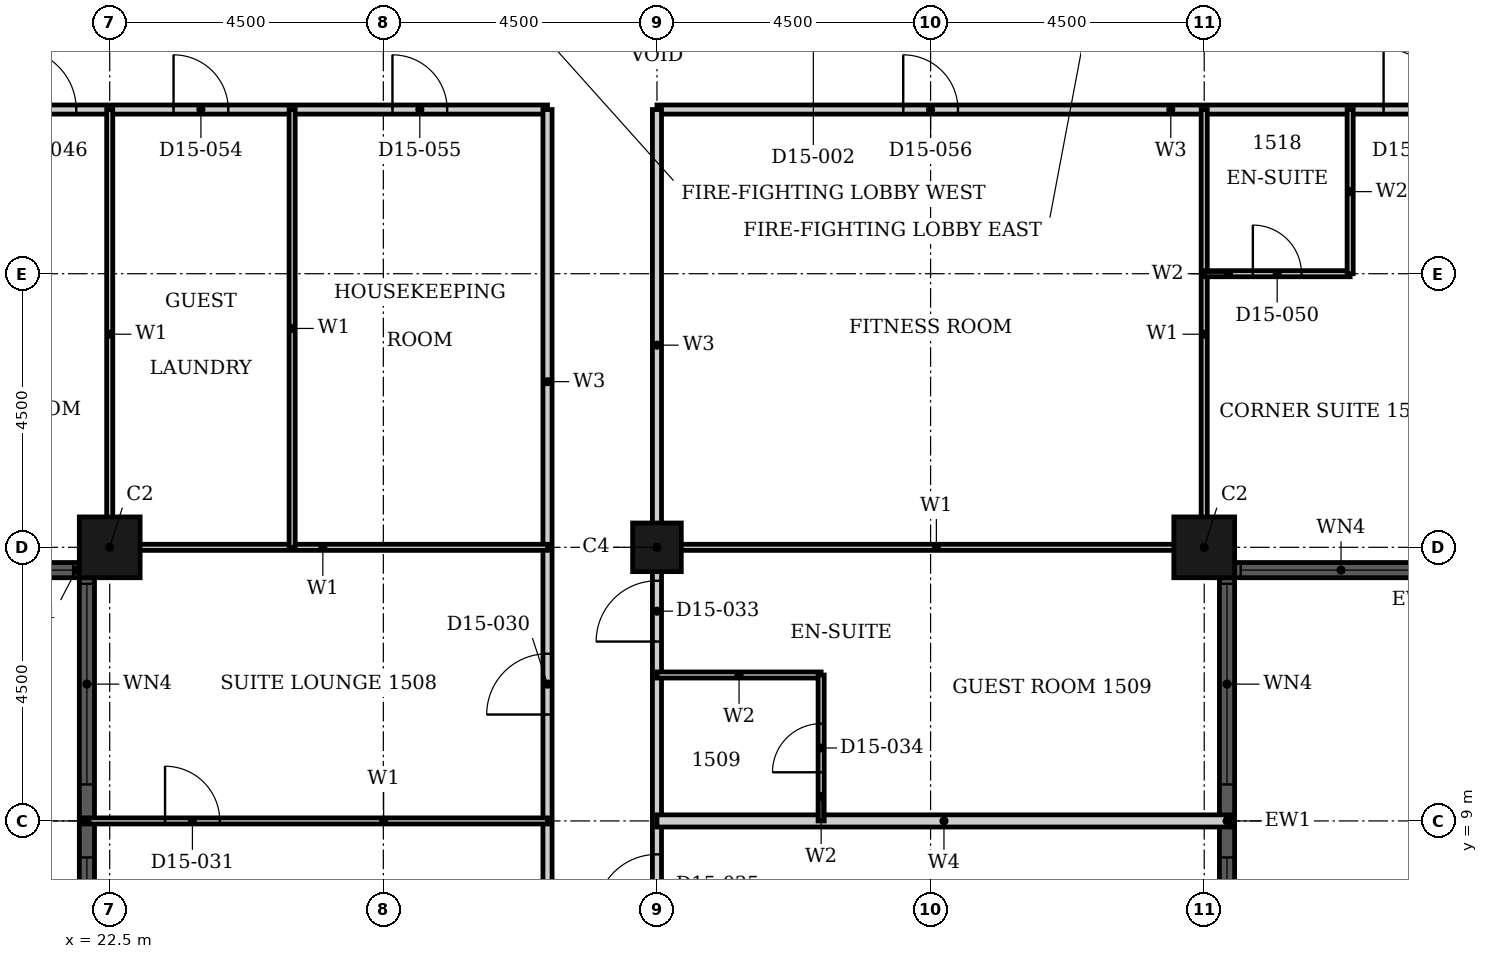
"""IFC4 building model, lengths in metres.
Left out: names, types, materials, properties, quantities, classifications, styles, units other than length and angle.
Written with IfcOpenShell. Run it as: python <this file> out.ifc"""

import sys

from ifc_helpers import new_model, si_unit, direction, frame, frame_2d, origin, origin_2d, place, context, subcontext, project, spatial, rectangle, hollow_rectangle, extrude, element, fill, save


model = new_model("IFC4")
c1 = context("Model", 3, precision=1e-05, world=origin(), true_north=direction((0.0, 1.0)))
c2 = subcontext(c1, "Body", "Model", "MODEL_VIEW")
j1 = project(units=[si_unit("LENGTHUNIT", "METRE"), si_unit("PLANEANGLEUNIT", "RADIAN")], contexts=[c1])
p1 = place(None, origin())
s1 = spatial("IfcSite", under=j1, at=p1, CompositionType="ELEMENT")
p2 = place(p1, origin())
s2 = spatial("IfcBuilding", under=s1, at=p2, CompositionType="ELEMENT")
p3 = place(p2, frame((0.0, 0.0, 67.2)))
s3 = spatial("IfcBuildingStorey", under=s2, at=p3, CompositionType="ELEMENT", Elevation=67.2)
for number, where, z_axis, x_axis in (
    (1, (40.5, 13.5, 0.0), (0.0, 0.0, 1.0), (1.0, 0.0, 0.0)),
    (2, (22.5, 13.5, 0.0), (0.0, 0.0, 1.0), (1.0, 0.0, 0.0)),
):
    element("IfcColumn", number, at=place(p3, frame(where, z_axis=z_axis, x_axis=x_axis)), inside=s3, PredefinedType="COLUMN", context=c2, shape_type="SweptSolid", body=[
        extrude(hollow_rectangle(XDim=1.0, YDim=1.0, WallThickness=0.032, at=origin_2d()), origin(), (0.0, 0.0, 1.0), 3.6),
    ])
p4 = place(p3, frame((31.5, 13.5, 0.0), z_axis=(0.0, 0.0, 1.0), x_axis=(1.0, 0.0, 0.0)))
e3 = element("IfcColumn", 3, at=p4, inside=s3, PredefinedType="COLUMN", context=c2, shape_type="SweptSolid", body=[
    extrude(hollow_rectangle(XDim=0.8, YDim=0.8, WallThickness=0.025, at=origin_2d()), origin(), (0.0, 0.0, 1.0), 3.6),
])
p5 = place(p3, frame((40.875, 5.0, 0.0), z_axis=(0.0, 0.0, 1.0), x_axis=(0.0, 1.0, 0.0)))
e4 = element("IfcWall", 4, at=p5, inside=s3, PredefinedType="SOLIDWALL", context=c2, shape_type="SweptSolid", body=[
    extrude(rectangle(XDim=8.0, YDim=0.25, at=frame_2d((4.0, 0.0))), origin(), (0.0, 0.0, 1.0), 3.6),
])
p6 = place(p5, frame((0.1, 0.0, 0.9)))
e5 = element("IfcOpeningElement", 5, at=p6, cuts=e4, PredefinedType="OPENING", context=c2, shape_type="SweptSolid", body=[
    extrude(rectangle(XDim=3.3, YDim=2.08, at=frame_2d((1.65, 1.04))), frame((0.0, 0.135, 0.0), z_axis=(0.0, -1.0, 0.0), x_axis=(1.0, 0.0, 0.0)), (0.0, 0.0, 1.0), 0.27),
])
p7 = place(p5, frame((4.6, 0.0, 0.9)))
e6 = element("IfcOpeningElement", 6, at=p7, cuts=e4, PredefinedType="OPENING", context=c2, shape_type="SweptSolid", body=[
    extrude(rectangle(XDim=3.3, YDim=2.08, at=frame_2d((1.65, 1.04))), frame((0.0, 0.135, 0.0), z_axis=(0.0, -1.0, 0.0), x_axis=(1.0, 0.0, 0.0)), (0.0, 0.0, 1.0), 0.27),
])
p8 = place(p3, frame((41.0, 13.125, 0.0), z_axis=(0.0, 0.0, 1.0), x_axis=(1.0, 0.0, 0.0)))
e7 = element("IfcWall", 7, at=p8, inside=s3, PredefinedType="SOLIDWALL", context=c2, shape_type="SweptSolid", body=[
    extrude(rectangle(XDim=3.5, YDim=0.25, at=frame_2d((1.75, 0.0))), origin(), (0.0, 0.0, 1.0), 3.6),
])
p9 = place(p8, frame((0.1, 0.0, 0.9)))
e8 = element("IfcOpeningElement", 8, at=p9, cuts=e7, PredefinedType="OPENING", context=c2, shape_type="SweptSolid", body=[
    extrude(rectangle(XDim=3.3, YDim=2.08, at=frame_2d((1.65, 1.04))), frame((0.0, 0.135, 0.0), z_axis=(0.0, -1.0, 0.0), x_axis=(1.0, 0.0, 0.0)), (0.0, 0.0, 1.0), 0.27),
])
p10 = place(p3, frame((18.5, 13.125, 0.0), z_axis=(0.0, 0.0, 1.0), x_axis=(1.0, 0.0, 0.0)))
e9 = element("IfcWall", 9, at=p10, inside=s3, PredefinedType="SOLIDWALL", context=c2, shape_type="SweptSolid", body=[
    extrude(rectangle(XDim=3.5, YDim=0.25, at=frame_2d((1.75, 0.0))), origin(), (0.0, 0.0, 1.0), 3.6),
])
p11 = place(p10, frame((0.1, 0.0, 0.9)))
e10 = element("IfcOpeningElement", 10, at=p11, cuts=e9, PredefinedType="OPENING", context=c2, shape_type="SweptSolid", body=[
    extrude(rectangle(XDim=3.3, YDim=2.08, at=frame_2d((1.65, 1.04))), frame((0.0, 0.135, 0.0), z_axis=(0.0, -1.0, 0.0), x_axis=(1.0, 0.0, 0.0)), (0.0, 0.0, 1.0), 0.27),
])
p12 = place(p3, frame((22.125, 13.0, 0.0), z_axis=(0.0, 0.0, 1.0), x_axis=(0.0, -1.0, 0.0)))
e11 = element("IfcWall", 11, at=p12, inside=s3, PredefinedType="SOLIDWALL", context=c2, shape_type="SweptSolid", body=[
    extrude(rectangle(XDim=8.0, YDim=0.25, at=frame_2d((4.0, 0.0))), origin(), (0.0, 0.0, 1.0), 3.6),
])
p13 = place(p12, frame((0.1, 0.0, 0.9)))
e12 = element("IfcOpeningElement", 12, at=p13, cuts=e11, PredefinedType="OPENING", context=c2, shape_type="SweptSolid", body=[
    extrude(rectangle(XDim=3.3, YDim=2.08, at=frame_2d((1.65, 1.04))), frame((0.0, 0.135, 0.0), z_axis=(0.0, -1.0, 0.0), x_axis=(1.0, 0.0, 0.0)), (0.0, 0.0, 1.0), 0.27),
])
p14 = place(p12, frame((4.6, 0.0, 0.9)))
e13 = element("IfcOpeningElement", 13, at=p14, cuts=e11, PredefinedType="OPENING", context=c2, shape_type="SweptSolid", body=[
    extrude(rectangle(XDim=3.3, YDim=2.08, at=frame_2d((1.65, 1.04))), frame((0.0, 0.135, 0.0), z_axis=(0.0, -1.0, 0.0), x_axis=(1.0, 0.0, 0.0)), (0.0, 0.0, 1.0), 0.27),
])
p15 = place(p3, frame((31.5, 20.7, 0.0), z_axis=(0.0, 0.0, 1.0), x_axis=(1.0, 0.0, 0.0)))
e14 = element("IfcWall", 14, at=p15, inside=s3, PredefinedType="PARTITIONING", context=c2, shape_type="SweptSolid", body=[
    extrude(rectangle(XDim=15.3, YDim=0.15, at=frame_2d((7.65, 0.0))), origin(), (0.0, 0.0, 1.0), 3.3),
])
p16 = place(p15, frame((11.95, 0.0, 0.0)))
e15 = element("IfcOpeningElement", 15, at=p16, cuts=e14, PredefinedType="OPENING", context=c2, shape_type="SweptSolid", body=[
    extrude(rectangle(XDim=1.0, YDim=2.1, at=frame_2d((0.5, 1.05))), frame((0.0, 0.085, 0.0), z_axis=(0.0, -1.0, 0.0), x_axis=(1.0, 0.0, 0.0)), (0.0, 0.0, 1.0), 0.17),
])
p17 = place(p15, frame((4.05, 0.0, 0.0)))
e16 = element("IfcOpeningElement", 16, at=p17, cuts=e14, PredefinedType="OPENING", context=c2, shape_type="SweptSolid", body=[
    extrude(rectangle(XDim=0.9, YDim=2.1, at=frame_2d((0.45, 1.05))), frame((0.0, 0.085, 0.0), z_axis=(0.0, -1.0, 0.0), x_axis=(1.0, 0.0, 0.0)), (0.0, 0.0, 1.0), 0.17),
])
p18 = place(p3, frame((16.2, 20.7, 0.0), z_axis=(0.0, 0.0, 1.0), x_axis=(1.0, 0.0, 0.0)))
e17 = element("IfcWall", 17, at=p18, inside=s3, PredefinedType="PARTITIONING", context=c2, shape_type="SweptSolid", body=[
    extrude(rectangle(XDim=13.5, YDim=0.15, at=frame_2d((6.75, 0.0))), origin(), (0.0, 0.0, 1.0), 3.3),
])
p19 = place(p18, frame((4.75, 0.0, 0.0)))
e18 = element("IfcOpeningElement", 18, at=p19, cuts=e17, PredefinedType="OPENING", context=c2, shape_type="SweptSolid", body=[
    extrude(rectangle(XDim=1.0, YDim=2.1, at=frame_2d((0.5, 1.05))), frame((0.0, 0.085, 0.0), z_axis=(0.0, -1.0, 0.0), x_axis=(1.0, 0.0, 0.0)), (0.0, 0.0, 1.0), 0.17),
])
p20 = place(p18, frame((0.45, 0.0, 0.0)))
e19 = element("IfcOpeningElement", 19, at=p20, cuts=e17, PredefinedType="OPENING", context=c2, shape_type="SweptSolid", body=[
    extrude(rectangle(XDim=0.9, YDim=2.1, at=frame_2d((0.45, 1.05))), frame((0.0, 0.085, 0.0), z_axis=(0.0, -1.0, 0.0), x_axis=(1.0, 0.0, 0.0)), (0.0, 0.0, 1.0), 0.17),
])
p21 = place(p18, frame((7.35, 0.0, 0.0)))
e20 = element("IfcOpeningElement", 20, at=p21, cuts=e17, PredefinedType="OPENING", context=c2, shape_type="SweptSolid", body=[
    extrude(rectangle(XDim=0.9, YDim=2.1, at=frame_2d((0.45, 1.05))), frame((0.0, 0.085, 0.0), z_axis=(0.0, -1.0, 0.0), x_axis=(1.0, 0.0, 0.0)), (0.0, 0.0, 1.0), 0.17),
])
p22 = place(p18, frame((10.95, 0.0, 0.0)))
e21 = element("IfcOpeningElement", 21, at=p22, cuts=e17, PredefinedType="OPENING", context=c2, shape_type="SweptSolid", body=[
    extrude(rectangle(XDim=0.9, YDim=2.1, at=frame_2d((0.45, 1.05))), frame((0.0, 0.085, 0.0), z_axis=(0.0, -1.0, 0.0), x_axis=(1.0, 0.0, 0.0)), (0.0, 0.0, 1.0), 0.17),
])
p23 = place(p3, frame((29.7, 4.5, 0.0), z_axis=(0.0, 0.0, 1.0), x_axis=(0.0, 1.0, 0.0)))
e22 = element("IfcWall", 22, at=p23, inside=s3, PredefinedType="PARTITIONING", context=c2, shape_type="SweptSolid", body=[
    extrude(rectangle(XDim=16.2, YDim=0.15, at=frame_2d((8.1, 0.0))), origin(), (0.0, 0.0, 1.0), 3.3),
])
p24 = place(p23, frame((6.25, 0.0, 0.0)))
e23 = element("IfcOpeningElement", 23, at=p24, cuts=e22, PredefinedType="OPENING", context=c2, shape_type="SweptSolid", body=[
    extrude(rectangle(XDim=1.0, YDim=2.1, at=frame_2d((0.5, 1.05))), frame((0.0, 0.085, 0.0), z_axis=(0.0, -1.0, 0.0), x_axis=(1.0, 0.0, 0.0)), (0.0, 0.0, 1.0), 0.17),
])
p25 = place(p3, frame((31.5, 4.5, 0.0), z_axis=(0.0, 0.0, 1.0), x_axis=(0.0, 1.0, 0.0)))
e24 = element("IfcWall", 24, at=p25, inside=s3, PredefinedType="PARTITIONING", context=c2, shape_type="SweptSolid", body=[
    extrude(rectangle(XDim=16.2, YDim=0.15, at=frame_2d((8.1, 0.0))), origin(), (0.0, 0.0, 1.0), 2.58),
])
p26 = place(p25, frame((7.45, 0.0, 0.0)))
e25 = element("IfcOpeningElement", 25, at=p26, cuts=e24, PredefinedType="OPENING", context=c2, shape_type="SweptSolid", body=[
    extrude(rectangle(XDim=1.0, YDim=2.1, at=frame_2d((0.5, 1.05))), frame((0.0, 0.085, 0.0), z_axis=(0.0, -1.0, 0.0), x_axis=(1.0, 0.0, 0.0)), (0.0, 0.0, 1.0), 0.17),
])
p27 = place(p25, frame((2.95, 0.0, 0.0)))
e26 = element("IfcOpeningElement", 26, at=p27, cuts=e24, PredefinedType="OPENING", context=c2, shape_type="SweptSolid", body=[
    extrude(rectangle(XDim=1.0, YDim=2.1, at=frame_2d((0.5, 1.05))), frame((0.0, 0.085, 0.0), z_axis=(0.0, -1.0, 0.0), x_axis=(1.0, 0.0, 0.0)), (0.0, 0.0, 1.0), 0.17),
])
p28 = place(p3, frame((31.5, 13.5, 0.0), z_axis=(0.0, 0.0, 1.0), x_axis=(1.0, 0.0, 0.0)))
e27 = element("IfcWall", 27, at=p28, inside=s3, PredefinedType="PARTITIONING", context=c2, shape_type="SweptSolid", body=[
    extrude(rectangle(XDim=9.19, YDim=0.1, at=frame_2d((4.595, 0.0))), origin(), (0.0, 0.0, 1.0), 2.38),
])
p29 = place(p3, frame((22.31, 13.5, 0.0), z_axis=(0.0, 0.0, 1.0), x_axis=(1.0, 0.0, 0.0)))
e28 = element("IfcWall", 28, at=p29, inside=s3, PredefinedType="PARTITIONING", context=c2, shape_type="SweptSolid", body=[
    extrude(rectangle(XDim=7.39, YDim=0.1, at=frame_2d((3.695, 0.0))), origin(), (0.0, 0.0, 1.0), 2.38),
])
p30 = place(p3, frame((22.06, 9.0, 0.0), z_axis=(0.0, 0.0, 1.0), x_axis=(1.0, 0.0, 0.0)))
e29 = element("IfcWall", 29, at=p30, inside=s3, PredefinedType="PARTITIONING", context=c2, shape_type="SweptSolid", body=[
    extrude(rectangle(XDim=7.64, YDim=0.1, at=frame_2d((3.82, 0.0))), origin(), (0.0, 0.0, 1.0), 3.3),
])
p31 = place(p30, frame((1.35, 0.0, 0.0)))
e30 = element("IfcOpeningElement", 30, at=p31, cuts=e29, PredefinedType="OPENING", context=c2, shape_type="SweptSolid", body=[
    extrude(rectangle(XDim=0.9, YDim=2.1, at=frame_2d((0.45, 1.05))), frame((0.0, 0.06, 0.0), z_axis=(0.0, -1.0, 0.0), x_axis=(1.0, 0.0, 0.0)), (0.0, 0.0, 1.0), 0.12),
])
p32 = place(p3, frame((22.5, 13.31, 0.0), z_axis=(0.0, 0.0, 1.0), x_axis=(0.0, 1.0, 0.0)))
e31 = element("IfcWall", 31, at=p32, inside=s3, PredefinedType="PARTITIONING", context=c2, shape_type="SweptSolid", body=[
    extrude(rectangle(XDim=7.39, YDim=0.1, at=frame_2d((3.695, 0.0))), origin(), (0.0, 0.0, 1.0), 3.3),
])
p33 = place(p3, frame((25.5, 13.5, 0.0), z_axis=(0.0, 0.0, 1.0), x_axis=(0.0, 1.0, 0.0)))
e32 = element("IfcWall", 32, at=p33, inside=s3, PredefinedType="PARTITIONING", context=c2, shape_type="SweptSolid", body=[
    extrude(rectangle(XDim=7.2, YDim=0.1, at=frame_2d((3.6, 0.0))), origin(), (0.0, 0.0, 1.0), 3.3),
])
p34 = place(p3, frame((40.5, 13.31, 0.0), z_axis=(0.0, 0.0, 1.0), x_axis=(0.0, 1.0, 0.0)))
e33 = element("IfcWall", 33, at=p34, inside=s3, PredefinedType="PARTITIONING", context=c2, shape_type="SweptSolid", body=[
    extrude(rectangle(XDim=7.39, YDim=0.1, at=frame_2d((3.695, 0.0))), origin(), (0.0, 0.0, 1.0), 3.3),
])
p35 = place(p3, frame((31.5, 9.0, 0.0), z_axis=(0.0, 0.0, 1.0), x_axis=(1.0, 0.0, 0.0)))
e34 = element("IfcWall", 34, at=p35, inside=s3, PredefinedType="PARTITIONING", context=c2, shape_type="SweptSolid", body=[
    extrude(rectangle(XDim=9.44, YDim=0.2, at=frame_2d((4.72, 0.0))), origin(), (0.0, 0.0, 1.0), 3.3),
])
p36 = place(p3, frame((31.5, 11.4, 0.0), z_axis=(0.0, 0.0, 1.0), x_axis=(1.0, 0.0, 0.0)))
e35 = element("IfcWall", 35, at=p36, inside=s3, PredefinedType="PARTITIONING", context=c2, shape_type="SweptSolid", body=[
    extrude(rectangle(XDim=2.7, YDim=0.1, at=frame_2d((1.35, 0.0))), origin(), (0.0, 0.0, 1.0), 3.3),
])
p37 = place(p3, frame((40.5, 18.0, 0.0), z_axis=(0.0, 0.0, 1.0), x_axis=(1.0, 0.0, 0.0)))
e36 = element("IfcWall", 36, at=p37, inside=s3, PredefinedType="PARTITIONING", context=c2, shape_type="SweptSolid", body=[
    extrude(rectangle(XDim=2.4, YDim=0.1, at=frame_2d((1.2, 0.0))), origin(), (0.0, 0.0, 1.0), 3.3),
])
p38 = place(p37, frame((0.8, 0.0, 0.0)))
e37 = element("IfcOpeningElement", 37, at=p38, cuts=e36, PredefinedType="OPENING", context=c2, shape_type="SweptSolid", body=[
    extrude(rectangle(XDim=0.8, YDim=2.1, at=frame_2d((0.4, 1.05))), frame((0.0, 0.06, 0.0), z_axis=(0.0, -1.0, 0.0), x_axis=(1.0, 0.0, 0.0)), (0.0, 0.0, 1.0), 0.12),
])
p39 = place(p3, frame((34.2, 9.0, 0.0), z_axis=(0.0, 0.0, 1.0), x_axis=(0.0, 1.0, 0.0)))
e38 = element("IfcWall", 38, at=p39, inside=s3, PredefinedType="PARTITIONING", context=c2, shape_type="SweptSolid", body=[
    extrude(rectangle(XDim=2.4, YDim=0.1, at=frame_2d((1.2, 0.0))), origin(), (0.0, 0.0, 1.0), 3.3),
])
p40 = place(p39, frame((0.8, 0.0, 0.0)))
e39 = element("IfcOpeningElement", 39, at=p40, cuts=e38, PredefinedType="OPENING", context=c2, shape_type="SweptSolid", body=[
    extrude(rectangle(XDim=0.8, YDim=2.1, at=frame_2d((0.4, 1.05))), frame((0.0, 0.06, 0.0), z_axis=(0.0, -1.0, 0.0), x_axis=(1.0, 0.0, 0.0)), (0.0, 0.0, 1.0), 0.12),
])
p41 = place(p3, frame((42.9, 18.0, 0.0), z_axis=(0.0, 0.0, 1.0), x_axis=(0.0, 1.0, 0.0)))
e40 = element("IfcWall", 40, at=p41, inside=s3, PredefinedType="PARTITIONING", context=c2, shape_type="SweptSolid", body=[
    extrude(rectangle(XDim=2.7, YDim=0.1, at=frame_2d((1.35, 0.0))), origin(), (0.0, 0.0, 1.0), 3.3),
])
p42 = place(p6, origin())
e41 = element("IfcWindow", 41, at=p42, inside=s3, PartitioningType="SINGLE_PANEL", PredefinedType="WINDOW", context=c2, shape_type="SweptSolid", body=[
    extrude(rectangle(XDim=3.3, YDim=2.08, at=frame_2d((1.65, 1.04))), frame((0.0, 0.03, 0.0), z_axis=(0.0, -1.0, 0.0), x_axis=(1.0, 0.0, 0.0)), (0.0, 0.0, 1.0), 0.06),
])
fill(e5, e41)
p43 = place(p7, origin())
e42 = element("IfcWindow", 42, at=p43, inside=s3, PartitioningType="SINGLE_PANEL", PredefinedType="WINDOW", context=c2, shape_type="SweptSolid", body=[
    extrude(rectangle(XDim=3.3, YDim=2.08, at=frame_2d((1.65, 1.04))), frame((0.0, 0.03, 0.0), z_axis=(0.0, -1.0, 0.0), x_axis=(1.0, 0.0, 0.0)), (0.0, 0.0, 1.0), 0.06),
])
fill(e6, e42)
p44 = place(p9, origin())
e43 = element("IfcWindow", 43, at=p44, inside=s3, PartitioningType="SINGLE_PANEL", PredefinedType="WINDOW", context=c2, shape_type="SweptSolid", body=[
    extrude(rectangle(XDim=3.3, YDim=2.08, at=frame_2d((1.65, 1.04))), frame((0.0, 0.03, 0.0), z_axis=(0.0, -1.0, 0.0), x_axis=(1.0, 0.0, 0.0)), (0.0, 0.0, 1.0), 0.06),
])
fill(e8, e43)
p45 = place(p11, origin())
e44 = element("IfcWindow", 44, at=p45, inside=s3, PartitioningType="SINGLE_PANEL", PredefinedType="WINDOW", context=c2, shape_type="SweptSolid", body=[
    extrude(rectangle(XDim=3.3, YDim=2.08, at=frame_2d((1.65, 1.04))), frame((0.0, 0.03, 0.0), z_axis=(0.0, -1.0, 0.0), x_axis=(1.0, 0.0, 0.0)), (0.0, 0.0, 1.0), 0.06),
])
fill(e10, e44)
p46 = place(p13, origin())
e45 = element("IfcWindow", 45, at=p46, inside=s3, PartitioningType="SINGLE_PANEL", PredefinedType="WINDOW", context=c2, shape_type="SweptSolid", body=[
    extrude(rectangle(XDim=3.3, YDim=2.08, at=frame_2d((1.65, 1.04))), frame((0.0, 0.03, 0.0), z_axis=(0.0, -1.0, 0.0), x_axis=(1.0, 0.0, 0.0)), (0.0, 0.0, 1.0), 0.06),
])
fill(e12, e45)
p47 = place(p14, origin())
e46 = element("IfcWindow", 46, at=p47, inside=s3, PartitioningType="SINGLE_PANEL", PredefinedType="WINDOW", context=c2, shape_type="SweptSolid", body=[
    extrude(rectangle(XDim=3.3, YDim=2.08, at=frame_2d((1.65, 1.04))), frame((0.0, 0.03, 0.0), z_axis=(0.0, -1.0, 0.0), x_axis=(1.0, 0.0, 0.0)), (0.0, 0.0, 1.0), 0.06),
])
fill(e13, e46)
p48 = place(p24, origin())
e47 = element("IfcDoor", 47, at=p48, inside=s3, OperationType="SINGLE_SWING_LEFT", PredefinedType="DOOR", context=c2, shape_type="SweptSolid", body=[
    extrude(rectangle(XDim=1.0, YDim=2.1, at=frame_2d((0.5, 1.05))), frame((0.0, 0.025, 0.0), z_axis=(0.0, -1.0, 0.0), x_axis=(1.0, 0.0, 0.0)), (0.0, 0.0, 1.0), 0.05),
])
fill(e23, e47)
p49 = place(p31, origin())
e48 = element("IfcDoor", 48, at=p49, inside=s3, OperationType="SINGLE_SWING_LEFT", PredefinedType="DOOR", context=c2, shape_type="SweptSolid", body=[
    extrude(rectangle(XDim=0.9, YDim=2.1, at=frame_2d((0.45, 1.05))), frame((0.0, 0.025, 0.0), z_axis=(0.0, -1.0, 0.0), x_axis=(1.0, 0.0, 0.0)), (0.0, 0.0, 1.0), 0.05),
])
fill(e30, e48)
p50 = place(p26, origin())
e49 = element("IfcDoor", 49, at=p50, inside=s3, OperationType="SINGLE_SWING_RIGHT", PredefinedType="DOOR", context=c2, shape_type="SweptSolid", body=[
    extrude(rectangle(XDim=1.0, YDim=2.1, at=frame_2d((0.5, 1.05))), frame((0.0, 0.025, 0.0), z_axis=(0.0, -1.0, 0.0), x_axis=(1.0, 0.0, 0.0)), (0.0, 0.0, 1.0), 0.05),
])
fill(e25, e49)
p51 = place(p40, origin())
e50 = element("IfcDoor", 50, at=p51, inside=s3, OperationType="SINGLE_SWING_RIGHT", PredefinedType="DOOR", context=c2, shape_type="SweptSolid", body=[
    extrude(rectangle(XDim=0.8, YDim=2.1, at=frame_2d((0.4, 1.05))), frame((0.0, 0.025, 0.0), z_axis=(0.0, -1.0, 0.0), x_axis=(1.0, 0.0, 0.0)), (0.0, 0.0, 1.0), 0.05),
])
fill(e39, e50)
p52 = place(p27, origin())
e51 = element("IfcDoor", 51, at=p52, inside=s3, OperationType="SINGLE_SWING_RIGHT", PredefinedType="DOOR", context=c2, shape_type="SweptSolid", body=[
    extrude(rectangle(XDim=1.0, YDim=2.1, at=frame_2d((0.5, 1.05))), frame((0.0, 0.025, 0.0), z_axis=(0.0, -1.0, 0.0), x_axis=(1.0, 0.0, 0.0)), (0.0, 0.0, 1.0), 0.05),
])
fill(e26, e51)
p53 = place(p19, origin())
e52 = element("IfcDoor", 52, at=p53, inside=s3, OperationType="SINGLE_SWING_RIGHT", PredefinedType="DOOR", context=c2, shape_type="SweptSolid", body=[
    extrude(rectangle(XDim=1.0, YDim=2.1, at=frame_2d((0.5, 1.05))), frame((0.0, 0.025, 0.0), z_axis=(0.0, -1.0, 0.0), x_axis=(1.0, 0.0, 0.0)), (0.0, 0.0, 1.0), 0.05),
])
fill(e18, e52)
p54 = place(p16, origin())
e53 = element("IfcDoor", 53, at=p54, inside=s3, OperationType="SINGLE_SWING_RIGHT", PredefinedType="DOOR", context=c2, shape_type="SweptSolid", body=[
    extrude(rectangle(XDim=1.0, YDim=2.1, at=frame_2d((0.5, 1.05))), frame((0.0, 0.025, 0.0), z_axis=(0.0, -1.0, 0.0), x_axis=(1.0, 0.0, 0.0)), (0.0, 0.0, 1.0), 0.05),
])
fill(e15, e53)
p55 = place(p38, origin())
e54 = element("IfcDoor", 54, at=p55, inside=s3, OperationType="SINGLE_SWING_LEFT", PredefinedType="DOOR", context=c2, shape_type="SweptSolid", body=[
    extrude(rectangle(XDim=0.8, YDim=2.1, at=frame_2d((0.4, 1.05))), frame((0.0, 0.025, 0.0), z_axis=(0.0, -1.0, 0.0), x_axis=(1.0, 0.0, 0.0)), (0.0, 0.0, 1.0), 0.05),
])
fill(e37, e54)
p56 = place(p21, origin())
e55 = element("IfcDoor", 55, at=p56, inside=s3, OperationType="SINGLE_SWING_RIGHT", PredefinedType="DOOR", context=c2, shape_type="SweptSolid", body=[
    extrude(rectangle(XDim=0.9, YDim=2.1, at=frame_2d((0.45, 1.05))), frame((0.0, 0.025, 0.0), z_axis=(0.0, -1.0, 0.0), x_axis=(1.0, 0.0, 0.0)), (0.0, 0.0, 1.0), 0.05),
])
fill(e20, e55)
p57 = place(p22, origin())
e56 = element("IfcDoor", 56, at=p57, inside=s3, OperationType="SINGLE_SWING_LEFT", PredefinedType="DOOR", context=c2, shape_type="SweptSolid", body=[
    extrude(rectangle(XDim=0.9, YDim=2.1, at=frame_2d((0.45, 1.05))), frame((0.0, 0.025, 0.0), z_axis=(0.0, -1.0, 0.0), x_axis=(1.0, 0.0, 0.0)), (0.0, 0.0, 1.0), 0.05),
])
fill(e21, e56)
p58 = place(p17, origin())
e57 = element("IfcDoor", 57, at=p58, inside=s3, OperationType="SINGLE_SWING_RIGHT", PredefinedType="DOOR", context=c2, shape_type="SweptSolid", body=[
    extrude(rectangle(XDim=0.9, YDim=2.1, at=frame_2d((0.45, 1.05))), frame((0.0, 0.025, 0.0), z_axis=(0.0, -1.0, 0.0), x_axis=(1.0, 0.0, 0.0)), (0.0, 0.0, 1.0), 0.05),
])
fill(e16, e57)
save(model, sys.argv[1])
